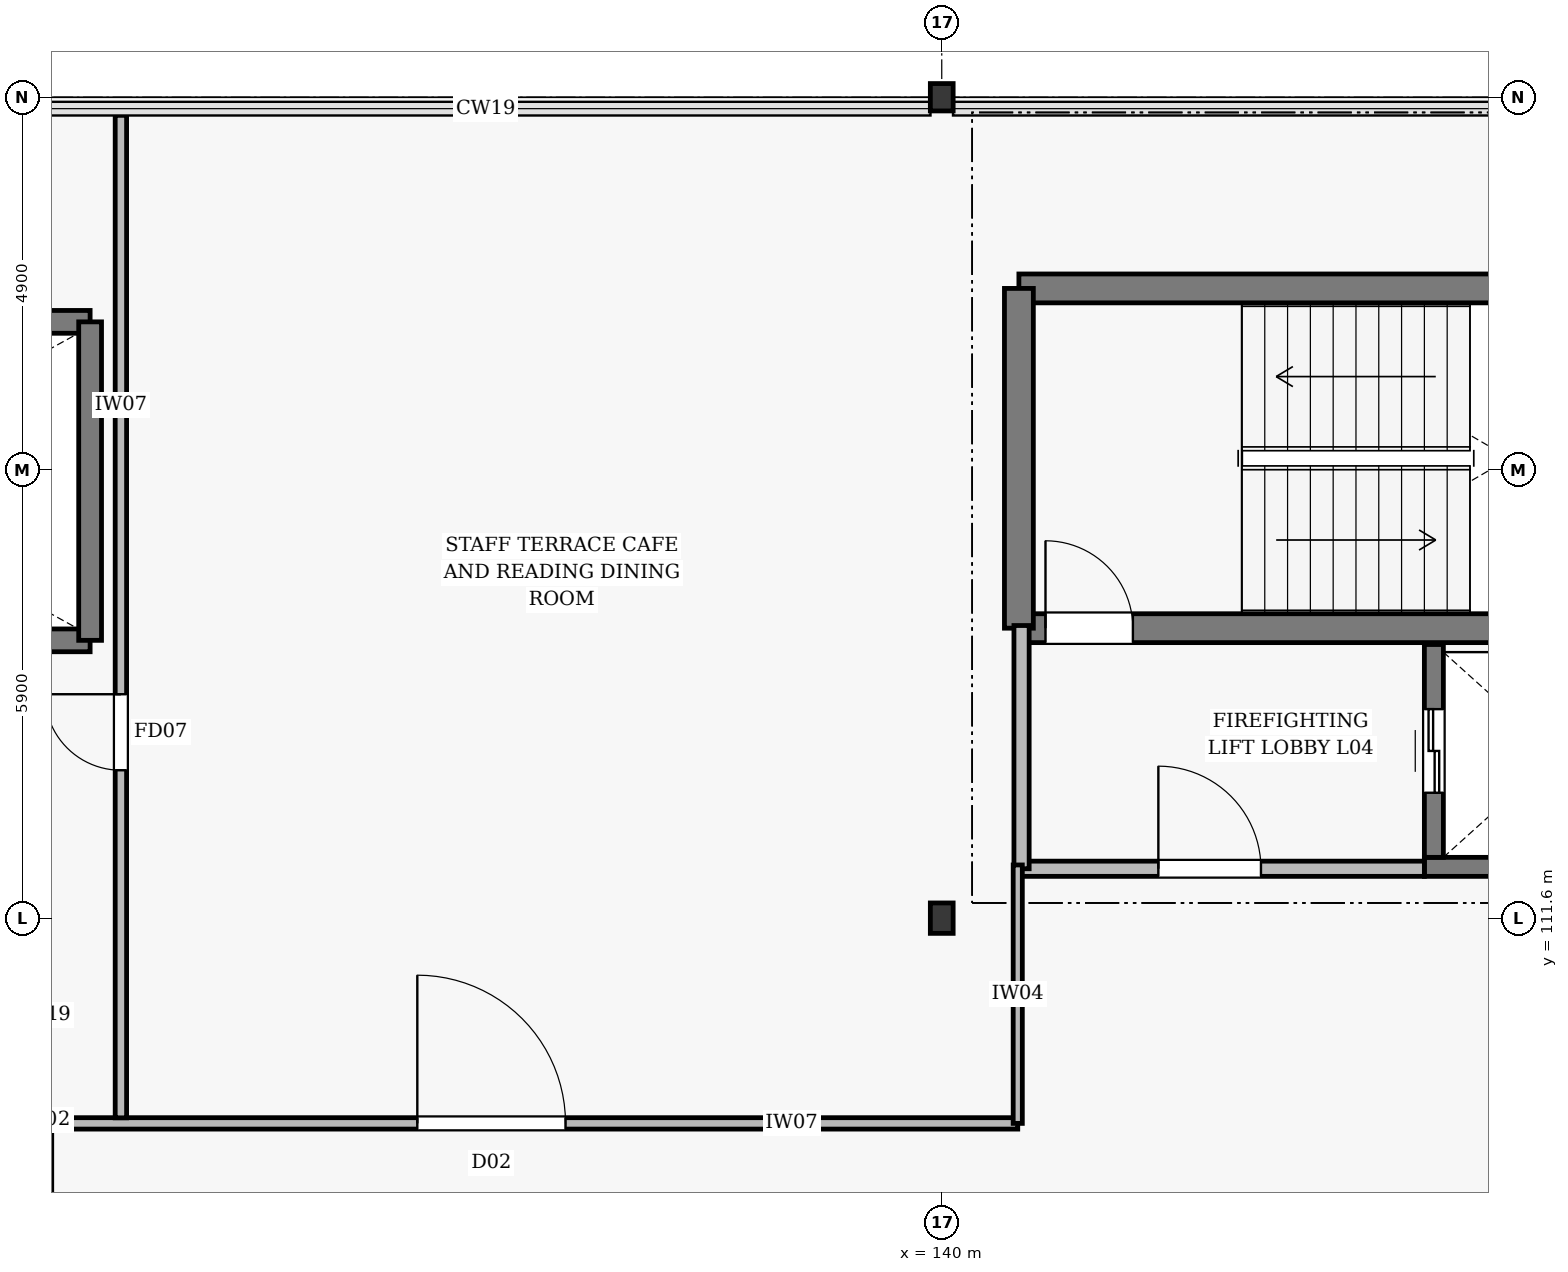
"""IFC4 building model, lengths in metres.
Left out: names, types, materials, properties, quantities, classifications, styles, units other than length and angle.
Written with IfcOpenShell. Run it as: python <this file> out.ifc"""

import sys

from ifc_helpers import new_model, si_unit, direction, frame, frame_2d, origin, origin_2d, place, context, subcontext, project, spatial, rectangle, i_section, extrude, element, fill, save


model = new_model("IFC4")
c1 = context("Model", 3, precision=1e-05, world=origin(), true_north=direction((0.0, 1.0)))
c2 = subcontext(c1, "Body", "Model", "MODEL_VIEW")
j1 = project(units=[si_unit("LENGTHUNIT", "METRE"), si_unit("PLANEANGLEUNIT", "RADIAN")], contexts=[c1])
p1 = place(None, origin())
s1 = spatial("IfcSite", under=j1, at=p1, CompositionType="ELEMENT")
p2 = place(p1, origin())
s2 = spatial("IfcBuilding", under=s1, at=p2, CompositionType="ELEMENT")
p3 = place(p2, frame((0.0, 0.0, 21.3)))
s3 = spatial("IfcBuildingStorey", under=s2, at=p3, CompositionType="ELEMENT", Elevation=21.3)
p4 = place(p3, frame((140.0, 111.6, 0.0), z_axis=(0.0, 0.0, 1.0), x_axis=(1.0, 0.0, 0.0)))
e1 = element("IfcColumn", 1, at=p4, inside=s3, PredefinedType="COLUMN", context=c2, shape_type="SweptSolid", body=[
    extrude(i_section(OverallWidth=0.3, OverallDepth=0.4, WebThickness=0.013, FlangeThickness=0.024, at=origin_2d()), origin(), (0.0, 0.0, 1.0), 3.9),
])
p5 = place(p3, frame((140.0, 122.4, 0.0), z_axis=(0.0, 0.0, 1.0), x_axis=(1.0, 0.0, 0.0)))
e2 = element("IfcColumn", 2, at=p5, inside=s3, PredefinedType="COLUMN", context=c2, shape_type="SweptSolid", body=[
    extrude(i_section(OverallWidth=0.3, OverallDepth=0.36, WebThickness=0.012, FlangeThickness=0.022, at=origin_2d()), origin(), (0.0, 0.0, 1.0), 3.9),
])
p6 = place(p3, frame((141.015, 115.415, 0.0), z_axis=(0.0, 0.0, 1.0), x_axis=(1.0, 0.0, 0.0)))
e3 = element("IfcWall", 3, at=p6, inside=s3, PredefinedType="SOLIDWALL", context=c2, shape_type="SweptSolid", body=[
    extrude(rectangle(XDim=10.17, YDim=0.38, at=frame_2d((5.085, 0.0))), origin(), (0.0, 0.0, 1.0), 3.9),
])
p7 = place(p6, frame((0.35, 0.0, 0.005)))
e4 = element("IfcOpeningElement", 4, at=p7, cuts=e3, PredefinedType="OPENING", context=c2, shape_type="SweptSolid", body=[
    extrude(rectangle(XDim=1.15, YDim=2.15, at=frame_2d((0.575, 1.075))), frame((0.0, 0.202, 0.0), z_axis=(0.0, -1.0, 0.0), x_axis=(1.0, 0.0, 0.0)), (0.0, 0.0, 1.0), 0.404),
])
p8 = place(p3, frame((141.015, 119.885, 0.0), z_axis=(0.0, 0.0, 1.0), x_axis=(1.0, 0.0, 0.0)))
e5 = element("IfcWall", 5, at=p8, inside=s3, PredefinedType="SOLIDWALL", context=c2, shape_type="SweptSolid", body=[
    extrude(rectangle(XDim=10.17, YDim=0.38, at=frame_2d((5.085, 0.0))), origin(), (0.0, 0.0, 1.0), 3.9),
])
p9 = place(p3, frame((141.015, 115.415, 0.0), z_axis=(0.0, 0.0, 1.0), x_axis=(0.0, 1.0, 0.0)))
e6 = element("IfcWall", 6, at=p9, inside=s3, PredefinedType="SOLIDWALL", context=c2, shape_type="SweptSolid", body=[
    extrude(rectangle(XDim=4.47, YDim=0.38, at=frame_2d((2.235, 0.0))), origin(), (0.0, 0.0, 1.0), 3.9),
])
p10 = place(p3, frame((118.855, 115.255, 0.0), z_axis=(0.0, 0.0, 1.0), x_axis=(1.0, 0.0, 0.0)))
e7 = element("IfcWall", 7, at=p10, inside=s3, PredefinedType="SOLIDWALL", context=c2, shape_type="SweptSolid", body=[
    extrude(rectangle(XDim=9.94, YDim=0.3, at=frame_2d((4.97, 0.0))), origin(), (0.0, 0.0, 1.0), 3.65),
])
p11 = place(p10, frame((0.35, 0.0, 0.005)))
e8 = element("IfcOpeningElement", 8, at=p11, cuts=e7, PredefinedType="OPENING", context=c2, shape_type="SweptSolid", body=[
    extrude(rectangle(XDim=1.15, YDim=2.15, at=frame_2d((0.575, 1.075))), frame((0.0, 0.162, 0.0), z_axis=(0.0, -1.0, 0.0), x_axis=(1.0, 0.0, 0.0)), (0.0, 0.0, 1.0), 0.324),
])
p12 = place(p3, frame((118.855, 119.445, 0.0), z_axis=(0.0, 0.0, 1.0), x_axis=(1.0, 0.0, 0.0)))
e9 = element("IfcWall", 9, at=p12, inside=s3, PredefinedType="SOLIDWALL", context=c2, shape_type="SweptSolid", body=[
    extrude(rectangle(XDim=9.94, YDim=0.3, at=frame_2d((4.97, 0.0))), origin(), (0.0, 0.0, 1.0), 3.65),
])
p13 = place(p3, frame((128.795, 115.255, 0.0), z_axis=(0.0, 0.0, 1.0), x_axis=(0.0, 1.0, 0.0)))
e10 = element("IfcWall", 10, at=p13, inside=s3, PredefinedType="SOLIDWALL", context=c2, shape_type="SweptSolid", body=[
    extrude(rectangle(XDim=4.19, YDim=0.3, at=frame_2d((2.095, 0.0))), origin(), (0.0, 0.0, 1.0), 3.65),
])
p14 = place(p3, frame((146.35, 112.275, 0.0), z_axis=(0.0, 0.0, 1.0), x_axis=(1.0, 0.0, 0.0)))
e11 = element("IfcWall", 11, at=p14, inside=s3, PredefinedType="SOLIDWALL", context=c2, shape_type="SweptSolid", body=[
    extrude(rectangle(XDim=3.5, YDim=0.25, at=frame_2d((1.75, 0.0))), origin(), (0.0, 0.0, 1.0), 3.9),
])
p15 = place(p3, frame((146.475, 112.4, 0.0), z_axis=(0.0, 0.0, 1.0), x_axis=(0.0, 1.0, 0.0)))
e12 = element("IfcWall", 12, at=p15, inside=s3, PredefinedType="SOLIDWALL", context=c2, shape_type="SweptSolid", body=[
    extrude(rectangle(XDim=2.8, YDim=0.25, at=frame_2d((1.4, 0.0))), origin(), (0.0, 0.0, 1.0), 3.9),
])
p16 = place(p15, frame((0.85, 0.0, 0.005)))
e13 = element("IfcOpeningElement", 13, at=p16, cuts=e12, PredefinedType="OPENING", context=c2, shape_type="SweptSolid", body=[
    extrude(rectangle(XDim=1.1, YDim=2.15, at=frame_2d((0.55, 1.075))), frame((0.0, 0.137, 0.0), z_axis=(0.0, -1.0, 0.0), x_axis=(1.0, 0.0, 0.0)), (0.0, 0.0, 1.0), 0.274),
])
p17 = place(p3, frame((141.05, 112.25, 0.0), z_axis=(0.0, 0.0, 1.0), x_axis=(1.0, 0.0, 0.0)))
e14 = element("IfcWall", 14, at=p17, inside=s3, PredefinedType="PARTITIONING", context=c2, shape_type="SweptSolid", body=[
    extrude(rectangle(XDim=5.3, YDim=0.2, at=frame_2d((2.65, 0.0))), origin(), (0.0, 0.0, 1.0), 3.5),
])
p18 = place(p17, frame((1.8, 0.0, 0.005)))
e15 = element("IfcOpeningElement", 15, at=p18, cuts=e14, PredefinedType="OPENING", context=c2, shape_type="SweptSolid", body=[
    extrude(rectangle(XDim=1.35, YDim=2.15, at=frame_2d((0.675, 1.075))), frame((0.0, 0.112, 0.0), z_axis=(0.0, -1.0, 0.0), x_axis=(1.0, 0.0, 0.0)), (0.0, 0.0, 1.0), 0.224),
])
p19 = place(p3, frame((141.05, 112.25, 0.0), z_axis=(0.0, 0.0, 1.0), x_axis=(0.0, 1.0, 0.0)))
e16 = element("IfcWall", 16, at=p19, inside=s3, PredefinedType="PARTITIONING", context=c2, shape_type="SweptSolid", body=[
    extrude(rectangle(XDim=3.2, YDim=0.2, at=frame_2d((1.6, 0.0))), origin(), (0.0, 0.0, 1.0), 3.5),
])
p20 = place(p3, frame((128.288, 108.9, 0.0), z_axis=(0.0, 0.0, 1.0), x_axis=(1.0, 0.0, 0.0)))
e17 = element("IfcWall", 17, at=p20, inside=s3, PredefinedType="PARTITIONING", context=c2, shape_type="SweptSolid", body=[
    extrude(rectangle(XDim=12.712, YDim=0.15, at=frame_2d((6.356, 0.0))), origin(), (0.0, 0.0, 1.0), 3.33),
])
p21 = place(p20, frame((4.812, 0.0, 0.005)))
e18 = element("IfcOpeningElement", 18, at=p21, cuts=e17, PredefinedType="OPENING", context=c2, shape_type="SweptSolid", body=[
    extrude(rectangle(XDim=1.95, YDim=2.3, at=frame_2d((0.975, 1.15))), frame((0.0, 0.087, 0.0), z_axis=(0.0, -1.0, 0.0), x_axis=(1.0, 0.0, 0.0)), (0.0, 0.0, 1.0), 0.174),
])
p22 = place(p3, frame((141.0, 108.9, 0.0), z_axis=(0.0, 0.0, 1.0), x_axis=(0.0, 1.0, 0.0)))
e19 = element("IfcWall", 19, at=p22, inside=s3, PredefinedType="PARTITIONING", context=c2, shape_type="SweptSolid", body=[
    extrude(rectangle(XDim=3.4, YDim=0.12, at=frame_2d((1.7, 0.0))), origin(), (0.0, 0.0, 1.0), 3.12),
])
p23 = place(p3, frame((129.2, 108.973, 0.0), z_axis=(0.0, 0.0, 1.0), x_axis=(0.0, 1.0, 0.0)))
e20 = element("IfcWall", 20, at=p23, inside=s3, PredefinedType="PARTITIONING", context=c2, shape_type="SweptSolid", body=[
    extrude(rectangle(XDim=13.189, YDim=0.15, at=frame_2d((6.595, 0.0))), origin(), (0.0, 0.0, 1.0), 3.33),
])
p24 = place(p23, frame((4.573, 0.0, 0.005)))
e21 = element("IfcOpeningElement", 21, at=p24, cuts=e20, PredefinedType="OPENING", context=c2, shape_type="SweptSolid", body=[
    extrude(rectangle(XDim=1.0, YDim=2.15, at=frame_2d((0.5, 1.075))), frame((0.0, 0.087, 0.0), z_axis=(0.0, -1.0, 0.0), x_axis=(1.0, 0.0, 0.0)), (0.0, 0.0, 1.0), 0.174),
])
p25 = place(p7, origin())
e22 = element("IfcDoor", 22, at=p25, inside=s3, OperationType="SINGLE_SWING_LEFT", PredefinedType="DOOR", context=c2, shape_type="SweptSolid", body=[
    extrude(rectangle(XDim=1.15, YDim=2.15, at=frame_2d((0.575, 1.075))), frame((0.0, 0.025, 0.0), z_axis=(0.0, -1.0, 0.0), x_axis=(1.0, 0.0, 0.0)), (0.0, 0.0, 1.0), 0.05),
])
fill(e4, e22)
p26 = place(p16, origin())
e23 = element("IfcDoor", 23, at=p26, inside=s3, OperationType="SLIDING_TO_LEFT", PredefinedType="DOOR", context=c2, shape_type="SweptSolid", body=[
    extrude(rectangle(XDim=1.1, YDim=2.15, at=frame_2d((0.55, 1.075))), frame((0.0, 0.025, 0.0), z_axis=(0.0, -1.0, 0.0), x_axis=(1.0, 0.0, 0.0)), (0.0, 0.0, 1.0), 0.05),
])
fill(e13, e23)
p27 = place(p18, origin())
e24 = element("IfcDoor", 24, at=p27, inside=s3, OperationType="SINGLE_SWING_LEFT", PredefinedType="DOOR", context=c2, shape_type="SweptSolid", body=[
    extrude(rectangle(XDim=1.35, YDim=2.15, at=frame_2d((0.675, 1.075))), frame((0.0, 0.025, 0.0), z_axis=(0.0, -1.0, 0.0), x_axis=(1.0, 0.0, 0.0)), (0.0, 0.0, 1.0), 0.05),
])
fill(e15, e24)
p28 = place(p21, origin())
e25 = element("IfcDoor", 25, at=p28, inside=s3, OperationType="DOUBLE_DOOR_SINGLE_SWING", PredefinedType="DOOR", context=c2, shape_type="SweptSolid", body=[
    extrude(rectangle(XDim=1.95, YDim=2.3, at=frame_2d((0.975, 1.15))), frame((0.0, 0.025, 0.0), z_axis=(0.0, -1.0, 0.0), x_axis=(1.0, 0.0, 0.0)), (0.0, 0.0, 1.0), 0.05),
])
fill(e18, e25)
p29 = place(p24, origin())
e26 = element("IfcDoor", 26, at=p29, inside=s3, OperationType="SINGLE_SWING_RIGHT", PredefinedType="DOOR", context=c2, shape_type="SweptSolid", body=[
    extrude(rectangle(XDim=1.0, YDim=2.15, at=frame_2d((0.5, 1.075))), frame((0.0, 0.025, 0.0), z_axis=(0.0, -1.0, 0.0), x_axis=(1.0, 0.0, 0.0)), (0.0, 0.0, 1.0), 0.05),
])
fill(e21, e26)
save(model, sys.argv[1])
